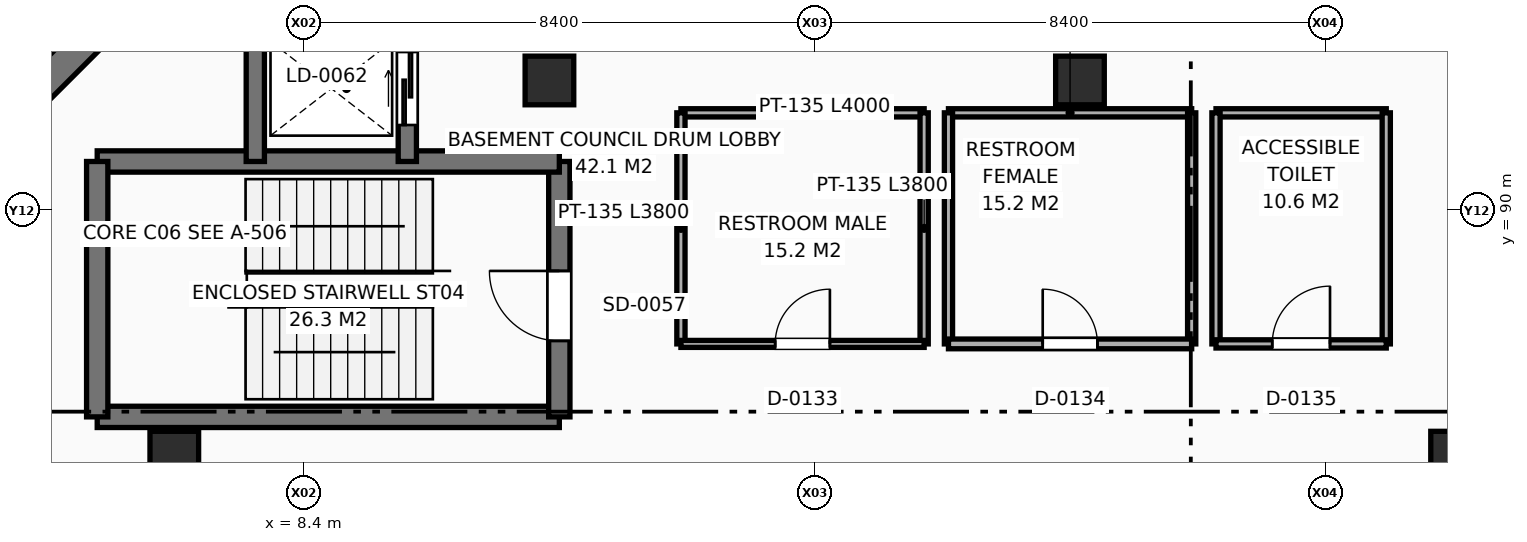
"""IFC4 building model, lengths in metres.
Left out: names, types, materials, properties, quantities, classifications, styles, units other than length and angle.
Written with IfcOpenShell. Run it as: python <this file> out.ifc"""

import sys

from ifc_helpers import new_model, si_unit, direction, frame, frame_2d, origin, origin_2d, place, context, subcontext, project, spatial, rectangle, circle, extrude, element, fill, save


model = new_model("IFC4")
c1 = context("Model", 3, precision=1e-05, world=origin(), true_north=direction((0.0, 1.0)))
c2 = subcontext(c1, "Body", "Model", "MODEL_VIEW")
j1 = project(units=[si_unit("LENGTHUNIT", "METRE"), si_unit("PLANEANGLEUNIT", "RADIAN")], contexts=[c1])
p1 = place(None, origin())
s1 = spatial("IfcSite", under=j1, at=p1, CompositionType="ELEMENT")
p2 = place(p1, origin())
s2 = spatial("IfcBuilding", under=s1, at=p2, CompositionType="ELEMENT")
p3 = place(p2, frame((0.0, 0.0, -4.2)))
s3 = spatial("IfcBuildingStorey", under=s2, at=p3, CompositionType="ELEMENT", Elevation=-4.2)
for number, where, z_axis, x_axis in (
    (1, (27.332, 85.963, 0.0), (0.0, 0.0, 1.0), (1.0, 0.0, 0.0)),
    (2, (21.163, 92.132, 0.0), (0.0, 0.0, 1.0), (1.0, 0.0, 0.0)),
    (3, (12.438, 92.132, 0.0), (0.0, 0.0, 1.0), (1.0, 0.0, 0.0)),
    (4, (6.268, 85.963, 0.0), (0.0, 0.0, 1.0), (1.0, 0.0, 0.0)),
):
    element("IfcColumn", number, at=place(p3, frame(where, z_axis=z_axis, x_axis=x_axis)), inside=s3, PredefinedType="COLUMN", context=c2, shape_type="SweptSolid", body=[
        extrude(circle(Radius=0.4, at=origin_2d()), origin(), (0.0, 0.0, 1.0), 4.2),
    ])
for number, where, z_axis, x_axis in (
    (5, (30.367, 91.198, 0.0), (0.0, 0.0, 1.0), (-0.707, 0.707, 0.0)),
    (6, (7.202, 95.167, 0.0), (0.0, 0.0, 1.0), (-0.707, -0.707, 0.0)),
):
    element("IfcWall", number, at=place(p3, frame(where, z_axis=z_axis, x_axis=x_axis)), inside=s3, PredefinedType="SOLIDWALL", context=c2, shape_type="SweptSolid", body=[
        extrude(rectangle(XDim=5.613, YDim=0.52, at=frame_2d((2.806, 0.0))), origin(), (0.0, 0.0, 1.0), 3.88),
    ])
p4 = place(p3, frame((5.0, 86.6, 0.0), z_axis=(0.0, 0.0, 1.0), x_axis=(1.0, 0.0, 0.0)))
e7 = element("IfcWall", 7, at=p4, inside=s3, PredefinedType="SHEAR", context=c2, shape_type="SweptSolid", body=[
    extrude(rectangle(XDim=7.6, YDim=0.35, at=frame_2d((3.8, 0.0))), origin(), (0.0, 0.0, 1.0), 3.92),
])
p5 = place(p3, frame((12.6, 86.6, 0.0), z_axis=(0.0, 0.0, 1.0), x_axis=(0.0, 1.0, 0.0)))
e8 = element("IfcWall", 8, at=p5, inside=s3, PredefinedType="SHEAR", context=c2, shape_type="SweptSolid", body=[
    extrude(rectangle(XDim=4.2, YDim=0.35, at=frame_2d((2.1, 0.0))), origin(), (0.0, 0.0, 1.0), 3.92),
])
p6 = place(p5, frame((1.25, 0.0, 0.0)))
e9 = element("IfcOpeningElement", 9, at=p6, cuts=e8, PredefinedType="OPENING", context=c2, shape_type="SweptSolid", body=[
    extrude(rectangle(XDim=1.15, YDim=2.2, at=frame_2d((0.575, 1.1))), frame((0.0, 0.185, 0.0), z_axis=(0.0, -1.0, 0.0), x_axis=(1.0, 0.0, 0.0)), (0.0, 0.0, 1.0), 0.37),
])
p7 = place(p3, frame((12.6, 90.8, 0.0), z_axis=(0.0, 0.0, 1.0), x_axis=(-1.0, 0.0, 0.0)))
e10 = element("IfcWall", 10, at=p7, inside=s3, PredefinedType="SHEAR", context=c2, shape_type="SweptSolid", body=[
    extrude(rectangle(XDim=7.6, YDim=0.35, at=frame_2d((3.8, 0.0))), origin(), (0.0, 0.0, 1.0), 3.92),
])
p8 = place(p3, frame((5.0, 90.8, 0.0), z_axis=(0.0, 0.0, 1.0), x_axis=(0.0, -1.0, 0.0)))
e11 = element("IfcWall", 11, at=p8, inside=s3, PredefinedType="SHEAR", context=c2, shape_type="SweptSolid", body=[
    extrude(rectangle(XDim=4.2, YDim=0.35, at=frame_2d((2.1, 0.0))), origin(), (0.0, 0.0, 1.0), 3.92),
])
p9 = place(p3, frame((7.6, 93.2, 0.0), z_axis=(0.0, 0.0, 1.0), x_axis=(0.0, -1.0, 0.0)))
e12 = element("IfcWall", 12, at=p9, inside=s3, PredefinedType="SHEAR", context=c2, shape_type="SweptSolid", body=[
    extrude(rectangle(XDim=2.4, YDim=0.3, at=frame_2d((1.2, 0.0))), origin(), (0.0, 0.0, 1.0), 3.92),
])
p10 = place(p3, frame((10.1, 90.8, 0.0), z_axis=(0.0, 0.0, 1.0), x_axis=(0.0, 1.0, 0.0)))
e13 = element("IfcWall", 13, at=p10, inside=s3, PredefinedType="SHEAR", context=c2, shape_type="SweptSolid", body=[
    extrude(rectangle(XDim=2.4, YDim=0.3, at=frame_2d((1.2, 0.0))), origin(), (0.0, 0.0, 1.0), 3.92),
])
p11 = place(p10, frame((0.6, 0.0, 0.0)))
e14 = element("IfcOpeningElement", 14, at=p11, cuts=e13, PredefinedType="OPENING", context=c2, shape_type="SweptSolid", body=[
    extrude(rectangle(XDim=1.2, YDim=2.25, at=frame_2d((0.6, 1.125))), frame((0.0, 0.16, 0.0), z_axis=(0.0, -1.0, 0.0), x_axis=(1.0, 0.0, 0.0)), (0.0, 0.0, 1.0), 0.32),
])
p12 = place(p3, frame((14.6, 91.6, 0.0), z_axis=(0.0, 0.0, 1.0), x_axis=(1.0, 0.0, 0.0)))
e15 = element("IfcWall", 15, at=p12, inside=s3, PredefinedType="PARTITIONING", context=c2, shape_type="SweptSolid", body=[
    extrude(rectangle(XDim=4.0, YDim=0.135, at=frame_2d((2.0, 0.0))), origin(), (0.0, 0.0, 1.0), 3.86),
])
p13 = place(p3, frame((18.6, 87.8, 0.0), z_axis=(0.0, 0.0, 1.0), x_axis=(0.0, 1.0, 0.0)))
e16 = element("IfcWall", 16, at=p13, inside=s3, PredefinedType="PARTITIONING", context=c2, shape_type="SweptSolid", body=[
    extrude(rectangle(XDim=3.8, YDim=0.135, at=frame_2d((1.9, 0.0))), origin(), (0.0, 0.0, 1.0), 3.86),
])
p14 = place(p3, frame((14.6, 87.8, 0.0), z_axis=(0.0, 0.0, 1.0), x_axis=(0.0, 1.0, 0.0)))
e17 = element("IfcWall", 17, at=p14, inside=s3, PredefinedType="PARTITIONING", context=c2, shape_type="SweptSolid", body=[
    extrude(rectangle(XDim=3.8, YDim=0.135, at=frame_2d((1.9, 0.0))), origin(), (0.0, 0.0, 1.0), 2.962),
])
p15 = place(p3, frame((14.6, 87.8, 0.0), z_axis=(0.0, 0.0, 1.0), x_axis=(1.0, 0.0, 0.0)))
e18 = element("IfcWall", 18, at=p15, inside=s3, PredefinedType="PARTITIONING", context=c2, shape_type="SweptSolid", body=[
    extrude(rectangle(XDim=4.0, YDim=0.115, at=frame_2d((2.0, 0.0))), origin(), (0.0, 0.0, 1.0), 3.86),
])
p16 = place(p15, frame((1.55, 0.0, 0.0)))
e19 = element("IfcOpeningElement", 19, at=p16, cuts=e18, PredefinedType="OPENING", context=c2, shape_type="SweptSolid", body=[
    extrude(rectangle(XDim=0.9, YDim=2.1, at=frame_2d((0.45, 1.05))), frame((0.0, 0.067, 0.0), z_axis=(0.0, -1.0, 0.0), x_axis=(1.0, 0.0, 0.0)), (0.0, 0.0, 1.0), 0.135),
])
p17 = place(p3, frame((19.0, 91.6, 0.0), z_axis=(0.0, 0.0, 1.0), x_axis=(1.0, 0.0, 0.0)))
e20 = element("IfcWall", 20, at=p17, inside=s3, PredefinedType="PARTITIONING", context=c2, shape_type="SweptSolid", body=[
    extrude(rectangle(XDim=4.0, YDim=0.135, at=frame_2d((2.0, 0.0))), origin(), (0.0, 0.0, 1.0), 3.86),
])
p18 = place(p3, frame((23.0, 87.8, 0.0), z_axis=(0.0, 0.0, 1.0), x_axis=(0.0, 1.0, 0.0)))
e21 = element("IfcWall", 21, at=p18, inside=s3, PredefinedType="PARTITIONING", context=c2, shape_type="SweptSolid", body=[
    extrude(rectangle(XDim=3.8, YDim=0.135, at=frame_2d((1.9, 0.0))), origin(), (0.0, 0.0, 1.0), 3.86),
])
p19 = place(p3, frame((19.0, 87.8, 0.0), z_axis=(0.0, 0.0, 1.0), x_axis=(0.0, 1.0, 0.0)))
e22 = element("IfcWall", 22, at=p19, inside=s3, PredefinedType="PARTITIONING", context=c2, shape_type="SweptSolid", body=[
    extrude(rectangle(XDim=3.8, YDim=0.135, at=frame_2d((1.9, 0.0))), origin(), (0.0, 0.0, 1.0), 2.962),
])
p20 = place(p3, frame((19.0, 87.8, 0.0), z_axis=(0.0, 0.0, 1.0), x_axis=(1.0, 0.0, 0.0)))
e23 = element("IfcWall", 23, at=p20, inside=s3, PredefinedType="PARTITIONING", context=c2, shape_type="SweptSolid", body=[
    extrude(rectangle(XDim=4.0, YDim=0.16, at=frame_2d((2.0, 0.0))), origin(), (0.0, 0.0, 1.0), 3.86),
])
p21 = place(p20, frame((1.55, 0.0, 0.0)))
e24 = element("IfcOpeningElement", 24, at=p21, cuts=e23, PredefinedType="OPENING", context=c2, shape_type="SweptSolid", body=[
    extrude(rectangle(XDim=0.9, YDim=2.1, at=frame_2d((0.45, 1.05))), frame((0.0, 0.09, 0.0), z_axis=(0.0, -1.0, 0.0), x_axis=(1.0, 0.0, 0.0)), (0.0, 0.0, 1.0), 0.18),
])
p22 = place(p3, frame((23.4, 91.6, 0.0), z_axis=(0.0, 0.0, 1.0), x_axis=(1.0, 0.0, 0.0)))
e25 = element("IfcWall", 25, at=p22, inside=s3, PredefinedType="PARTITIONING", context=c2, shape_type="SweptSolid", body=[
    extrude(rectangle(XDim=2.8, YDim=0.135, at=frame_2d((1.4, 0.0))), origin(), (0.0, 0.0, 1.0), 3.86),
])
for number, where, z_axis, x_axis in (
    (26, (26.2, 87.8, 0.0), (0.0, 0.0, 1.0), (0.0, 1.0, 0.0)),
    (27, (23.4, 87.8, 0.0), (0.0, 0.0, 1.0), (0.0, 1.0, 0.0)),
):
    element("IfcWall", number, at=place(p3, frame(where, z_axis=z_axis, x_axis=x_axis)), inside=s3, PredefinedType="PARTITIONING", context=c2, shape_type="SweptSolid", body=[
        extrude(rectangle(XDim=3.8, YDim=0.135, at=frame_2d((1.9, 0.0))), origin(), (0.0, 0.0, 1.0), 3.86),
    ])
p23 = place(p3, frame((23.4, 87.8, 0.0), z_axis=(0.0, 0.0, 1.0), x_axis=(1.0, 0.0, 0.0)))
e28 = element("IfcWall", 28, at=p23, inside=s3, PredefinedType="PARTITIONING", context=c2, shape_type="SweptSolid", body=[
    extrude(rectangle(XDim=2.8, YDim=0.135, at=frame_2d((1.4, 0.0))), origin(), (0.0, 0.0, 1.0), 3.86),
])
p24 = place(p23, frame((0.925, 0.0, 0.0)))
e29 = element("IfcOpeningElement", 29, at=p24, cuts=e28, PredefinedType="OPENING", context=c2, shape_type="SweptSolid", body=[
    extrude(rectangle(XDim=0.95, YDim=2.1, at=frame_2d((0.475, 1.05))), frame((0.0, 0.077, 0.0), z_axis=(0.0, -1.0, 0.0), x_axis=(1.0, 0.0, 0.0)), (0.0, 0.0, 1.0), 0.155),
])
p25 = place(p6, origin())
e30 = element("IfcDoor", 30, at=p25, inside=s3, OperationType="SINGLE_SWING_RIGHT", PredefinedType="DOOR", context=c2, shape_type="SweptSolid", body=[
    extrude(rectangle(XDim=1.15, YDim=2.2, at=frame_2d((0.575, 1.1))), frame((0.0, 0.025, 0.0), z_axis=(0.0, -1.0, 0.0), x_axis=(1.0, 0.0, 0.0)), (0.0, 0.0, 1.0), 0.05),
])
fill(e9, e30)
p26 = place(p11, origin())
e31 = element("IfcDoor", 31, at=p26, inside=s3, OperationType="SLIDING_TO_LEFT", PredefinedType="DOOR", context=c2, shape_type="SweptSolid", body=[
    extrude(rectangle(XDim=1.2, YDim=2.25, at=frame_2d((0.6, 1.125))), frame((0.0, 0.025, 0.0), z_axis=(0.0, -1.0, 0.0), x_axis=(1.0, 0.0, 0.0)), (0.0, 0.0, 1.0), 0.05),
])
fill(e14, e31)
p27 = place(p16, origin())
e32 = element("IfcDoor", 32, at=p27, inside=s3, OperationType="SINGLE_SWING_RIGHT", PredefinedType="DOOR", context=c2, shape_type="SweptSolid", body=[
    extrude(rectangle(XDim=0.9, YDim=2.1, at=frame_2d((0.45, 1.05))), frame((0.0, 0.025, 0.0), z_axis=(0.0, -1.0, 0.0), x_axis=(1.0, 0.0, 0.0)), (0.0, 0.0, 1.0), 0.05),
])
fill(e19, e32)
p28 = place(p21, origin())
e33 = element("IfcDoor", 33, at=p28, inside=s3, OperationType="SINGLE_SWING_LEFT", PredefinedType="DOOR", context=c2, shape_type="SweptSolid", body=[
    extrude(rectangle(XDim=0.9, YDim=2.1, at=frame_2d((0.45, 1.05))), frame((0.0, 0.025, 0.0), z_axis=(0.0, -1.0, 0.0), x_axis=(1.0, 0.0, 0.0)), (0.0, 0.0, 1.0), 0.05),
])
fill(e24, e33)
p29 = place(p24, origin())
e34 = element("IfcDoor", 34, at=p29, inside=s3, OperationType="SINGLE_SWING_RIGHT", PredefinedType="DOOR", context=c2, shape_type="SweptSolid", body=[
    extrude(rectangle(XDim=0.95, YDim=2.1, at=frame_2d((0.475, 1.05))), frame((0.0, 0.025, 0.0), z_axis=(0.0, -1.0, 0.0), x_axis=(1.0, 0.0, 0.0)), (0.0, 0.0, 1.0), 0.05),
])
fill(e29, e34)
save(model, sys.argv[1])
